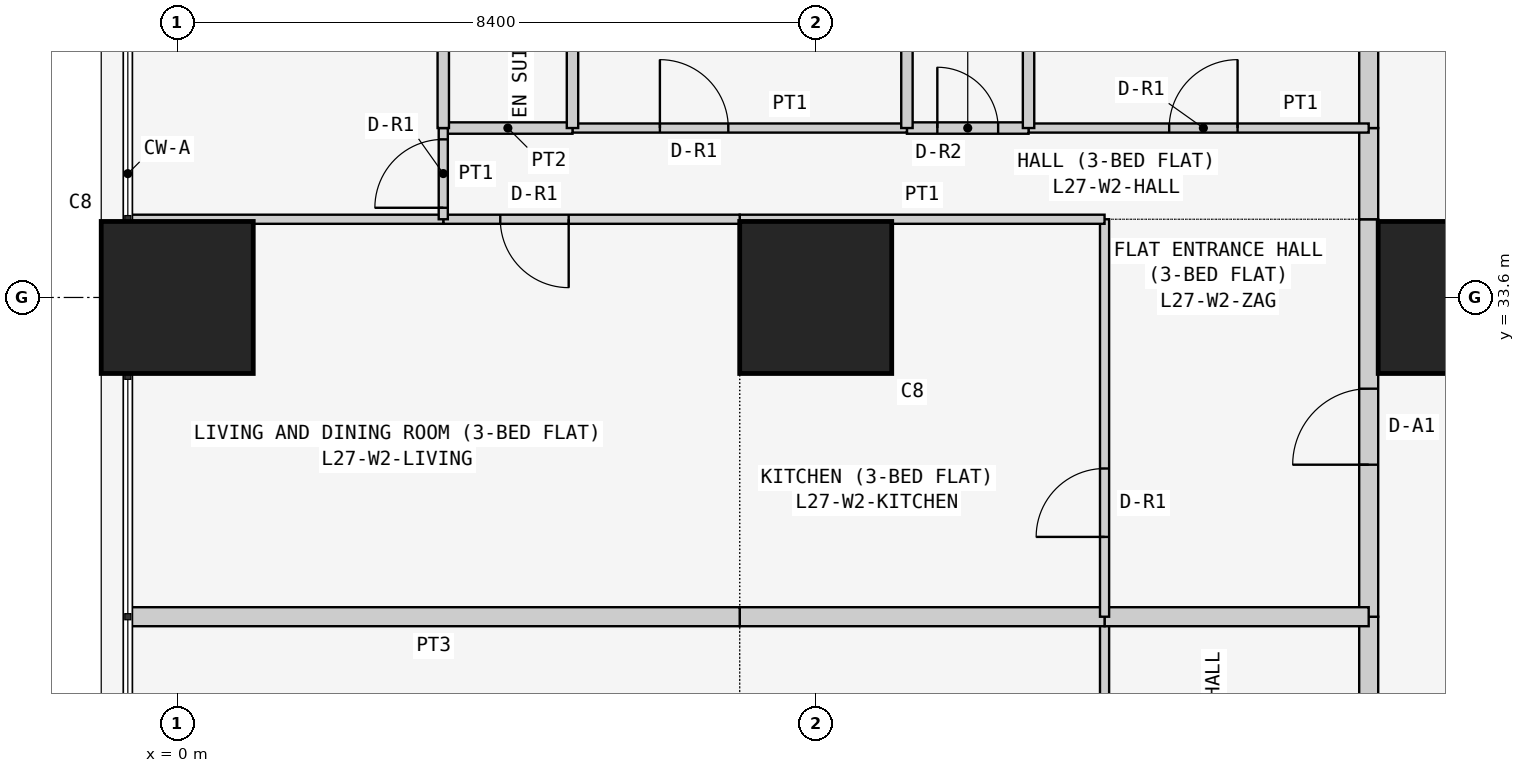
"""IFC4 building model, lengths in metres.
Left out: names, types, materials, properties, quantities, classifications, styles, units other than length and angle.
Written with IfcOpenShell. Run it as: python <this file> out.ifc"""

import sys

from ifc_helpers import new_model, si_unit, direction, frame, frame_2d, origin, origin_2d, place, context, subcontext, project, spatial, rectangle, extrude, element, fill, save


model = new_model("IFC4")
c1 = context("Model", 3, precision=1e-05, world=origin(), true_north=direction((0.0, 1.0)))
c2 = subcontext(c1, "Body", "Model", "MODEL_VIEW")
j1 = project(units=[si_unit("LENGTHUNIT", "METRE"), si_unit("PLANEANGLEUNIT", "RADIAN")], contexts=[c1])
p1 = place(None, origin())
s1 = spatial("IfcSite", under=j1, at=p1, CompositionType="ELEMENT")
p2 = place(p1, origin())
s2 = spatial("IfcBuilding", under=s1, at=p2, CompositionType="ELEMENT")
p3 = place(p2, frame((0.0, 0.0, 108.9)))
s3 = spatial("IfcBuildingStorey", under=s2, at=p3, CompositionType="ELEMENT", Elevation=108.9)
for number, where, z_axis, x_axis in (
    (1, (0.0, 33.6, 0.0), (0.0, 0.0, 1.0), (1.0, 0.0, 0.0)),
    (2, (8.4, 33.6, 0.0), (0.0, 0.0, 1.0), (1.0, 0.0, 0.0)),
    (3, (16.8, 33.6, 0.0), (0.0, 0.0, 1.0), (1.0, 0.0, 0.0)),
):
    element("IfcColumn", number, at=place(p3, frame(where, z_axis=z_axis, x_axis=x_axis)), inside=s3, PredefinedType="COLUMN", context=c2, shape_type="SweptSolid", body=[
        extrude(rectangle(XDim=2.0, YDim=2.0, at=origin_2d()), origin(), (0.0, 0.0, 1.0), 3.6),
    ])
p4 = place(p3, frame((15.675, 24.171, 0.0), z_axis=(0.0, 0.0, 1.0), x_axis=(0.0, 1.0, 0.0)))
e4 = element("IfcWall", 4, at=p4, inside=s3, PredefinedType="PARTITIONING", context=c2, shape_type="SweptSolid", body=[
    extrude(rectangle(XDim=5.229, YDim=0.25, at=frame_2d((2.615, 0.0))), origin(), (0.0, 0.0, 1.0), 3.45),
])
p5 = place(p4, frame((2.179, 0.0, 0.0)))
e5 = element("IfcOpeningElement", 5, at=p5, cuts=e4, PredefinedType="OPENING", context=c2, shape_type="SweptSolid", body=[
    extrude(rectangle(XDim=1.0, YDim=2.1, at=frame_2d((0.5, 1.05))), frame((0.0, 0.135, 0.0), z_axis=(0.0, -1.0, 0.0), x_axis=(1.0, 0.0, 0.0)), (0.0, 0.0, 1.0), 0.27),
])
p6 = place(p3, frame((15.675, 29.4, 0.0), z_axis=(0.0, 0.0, 1.0), x_axis=(0.0, 1.0, 0.0)))
e6 = element("IfcWall", 6, at=p6, inside=s3, PredefinedType="PARTITIONING", context=c2, shape_type="SweptSolid", body=[
    extrude(rectangle(XDim=5.229, YDim=0.25, at=frame_2d((2.615, 0.0))), origin(), (0.0, 0.0, 1.0), 3.45),
])
p7 = place(p6, frame((2.0, 0.0, 0.0)))
e7 = element("IfcOpeningElement", 7, at=p7, cuts=e6, PredefinedType="OPENING", context=c2, shape_type="SweptSolid", body=[
    extrude(rectangle(XDim=1.0, YDim=2.1, at=frame_2d((0.5, 1.05))), frame((0.0, 0.135, 0.0), z_axis=(0.0, -1.0, 0.0), x_axis=(1.0, 0.0, 0.0)), (0.0, 0.0, 1.0), 0.27),
])
p8 = place(p3, frame((15.675, 34.629, 0.0), z_axis=(0.0, 0.0, 1.0), x_axis=(0.0, 1.0, 0.0)))
e8 = element("IfcWall", 8, at=p8, inside=s3, PredefinedType="PARTITIONING", context=c2, shape_type="SweptSolid", body=[
    extrude(rectangle(XDim=1.2, YDim=0.25, at=frame_2d((0.6, 0.0))), origin(), (0.0, 0.0, 1.0), 3.45),
])
p9 = place(p3, frame((15.675, 35.829, 0.0), z_axis=(0.0, 0.0, 1.0), x_axis=(0.0, 1.0, 0.0)))
e9 = element("IfcWall", 9, at=p9, inside=s3, PredefinedType="PARTITIONING", context=c2, shape_type="SweptSolid", body=[
    extrude(rectangle(XDim=6.871, YDim=0.25, at=frame_2d((3.436, 0.0))), origin(), (0.0, 0.0, 1.0), 3.45),
])
p10 = place(p3, frame((12.2, 29.4, 0.0), z_axis=(0.0, 0.0, 1.0), x_axis=(0.0, -1.0, 0.0)))
e10 = element("IfcWall", 10, at=p10, inside=s3, PredefinedType="PARTITIONING", context=c2, shape_type="SweptSolid", body=[
    extrude(rectangle(XDim=5.229, YDim=0.12, at=frame_2d((2.615, 0.0))), origin(), (0.0, 0.0, 1.0), 3.45),
])
p11 = place(p10, frame((1.05, 0.0, 0.0)))
e11 = element("IfcOpeningElement", 11, at=p11, cuts=e10, PredefinedType="OPENING", context=c2, shape_type="SweptSolid", body=[
    extrude(rectangle(XDim=0.9, YDim=2.1, at=frame_2d((0.45, 1.05))), frame((0.0, 0.07, 0.0), z_axis=(0.0, -1.0, 0.0), x_axis=(1.0, 0.0, 0.0)), (0.0, 0.0, 1.0), 0.14),
])
p12 = place(p3, frame((15.675, 29.4, 0.0), z_axis=(0.0, 0.0, 1.0), x_axis=(-1.0, 0.0, 0.0)))
e12 = element("IfcWall", 12, at=p12, inside=s3, PredefinedType="PARTITIONING", context=c2, shape_type="SweptSolid", body=[
    extrude(rectangle(XDim=3.475, YDim=0.25, at=frame_2d((1.738, 0.0))), origin(), (0.0, 0.0, 1.0), 3.45),
])
p13 = place(p3, frame((12.2, 29.4, 0.0), z_axis=(0.0, 0.0, 1.0), x_axis=(-1.0, 0.0, 0.0)))
e13 = element("IfcWall", 13, at=p13, inside=s3, PredefinedType="PARTITIONING", context=c2, shape_type="SweptSolid", body=[
    extrude(rectangle(XDim=4.8, YDim=0.25, at=frame_2d((2.4, 0.0))), origin(), (0.0, 0.0, 1.0), 3.45),
])
p14 = place(p3, frame((7.4, 29.4, 0.0), z_axis=(0.0, 0.0, 1.0), x_axis=(-1.0, 0.0, 0.0)))
e14 = element("IfcWall", 14, at=p14, inside=s3, PredefinedType="PARTITIONING", context=c2, shape_type="SweptSolid", body=[
    extrude(rectangle(XDim=8.05, YDim=0.25, at=frame_2d((4.025, 0.0))), origin(), (0.0, 0.0, 1.0), 3.45),
])
p15 = place(p3, frame((12.2, 29.4, 0.0), z_axis=(0.0, 0.0, 1.0), x_axis=(0.0, 1.0, 0.0)))
e15 = element("IfcWall", 15, at=p15, inside=s3, PredefinedType="PARTITIONING", context=c2, shape_type="SweptSolid", body=[
    extrude(rectangle(XDim=5.229, YDim=0.12, at=frame_2d((2.615, 0.0))), origin(), (0.0, 0.0, 1.0), 3.45),
])
p16 = place(p15, frame((1.05, 0.0, 0.0)))
e16 = element("IfcOpeningElement", 16, at=p16, cuts=e15, PredefinedType="OPENING", context=c2, shape_type="SweptSolid", body=[
    extrude(rectangle(XDim=0.9, YDim=2.1, at=frame_2d((0.45, 1.05))), frame((0.0, 0.07, 0.0), z_axis=(0.0, -1.0, 0.0), x_axis=(1.0, 0.0, 0.0)), (0.0, 0.0, 1.0), 0.14),
])
p17 = place(p3, frame((7.4, 34.629, 0.0), z_axis=(0.0, 0.0, 1.0), x_axis=(1.0, 0.0, 0.0)))
e17 = element("IfcWall", 17, at=p17, inside=s3, PredefinedType="PARTITIONING", context=c2, shape_type="SweptSolid", body=[
    extrude(rectangle(XDim=4.8, YDim=0.12, at=frame_2d((2.4, 0.0))), origin(), (0.0, 0.0, 1.0), 3.45),
])
p18 = place(p3, frame((3.5, 34.629, 0.0), z_axis=(0.0, 0.0, 1.0), x_axis=(1.0, 0.0, 0.0)))
e18 = element("IfcWall", 18, at=p18, inside=s3, PredefinedType="PARTITIONING", context=c2, shape_type="SweptSolid", body=[
    extrude(rectangle(XDim=3.9, YDim=0.12, at=frame_2d((1.95, 0.0))), origin(), (0.0, 0.0, 1.0), 3.45),
])
p19 = place(p18, frame((0.75, 0.0, 0.0)))
e19 = element("IfcOpeningElement", 19, at=p19, cuts=e18, PredefinedType="OPENING", context=c2, shape_type="SweptSolid", body=[
    extrude(rectangle(XDim=0.9, YDim=2.1, at=frame_2d((0.45, 1.05))), frame((0.0, 0.07, 0.0), z_axis=(0.0, -1.0, 0.0), x_axis=(1.0, 0.0, 0.0)), (0.0, 0.0, 1.0), 0.14),
])
p20 = place(p3, frame((-0.65, 34.629, 0.0), z_axis=(0.0, 0.0, 1.0), x_axis=(1.0, 0.0, 0.0)))
e20 = element("IfcWall", 20, at=p20, inside=s3, PredefinedType="PARTITIONING", context=c2, shape_type="SweptSolid", body=[
    extrude(rectangle(XDim=4.15, YDim=0.12, at=frame_2d((2.075, 0.0))), origin(), (0.0, 0.0, 1.0), 3.45),
])
p21 = place(p3, frame((11.2, 35.829, 0.0), z_axis=(0.0, 0.0, 1.0), x_axis=(1.0, 0.0, 0.0)))
e21 = element("IfcWall", 21, at=p21, inside=s3, PredefinedType="PARTITIONING", context=c2, shape_type="SweptSolid", body=[
    extrude(rectangle(XDim=4.475, YDim=0.12, at=frame_2d((2.238, 0.0))), origin(), (0.0, 0.0, 1.0), 3.45),
])
p22 = place(p21, frame((1.85, 0.0, 0.0)))
e22 = element("IfcOpeningElement", 22, at=p22, cuts=e21, PredefinedType="OPENING", context=c2, shape_type="SweptSolid", body=[
    extrude(rectangle(XDim=0.9, YDim=2.1, at=frame_2d((0.45, 1.05))), frame((0.0, 0.07, 0.0), z_axis=(0.0, -1.0, 0.0), x_axis=(1.0, 0.0, 0.0)), (0.0, 0.0, 1.0), 0.14),
])
p23 = place(p3, frame((9.6, 35.829, 0.0), z_axis=(0.0, 0.0, 1.0), x_axis=(1.0, 0.0, 0.0)))
e23 = element("IfcWall", 23, at=p23, inside=s3, PredefinedType="PARTITIONING", context=c2, shape_type="SweptSolid", body=[
    extrude(rectangle(XDim=1.6, YDim=0.15, at=frame_2d((0.8, 0.0))), origin(), (0.0, 0.0, 1.0), 3.45),
])
p24 = place(p23, frame((0.4, 0.0, 0.0)))
e24 = element("IfcOpeningElement", 24, at=p24, cuts=e23, PredefinedType="OPENING", context=c2, shape_type="SweptSolid", body=[
    extrude(rectangle(XDim=0.8, YDim=2.1, at=frame_2d((0.4, 1.05))), frame((0.0, 0.085, 0.0), z_axis=(0.0, -1.0, 0.0), x_axis=(1.0, 0.0, 0.0)), (0.0, 0.0, 1.0), 0.17),
])
p25 = place(p3, frame((5.2, 35.829, 0.0), z_axis=(0.0, 0.0, 1.0), x_axis=(1.0, 0.0, 0.0)))
e25 = element("IfcWall", 25, at=p25, inside=s3, PredefinedType="PARTITIONING", context=c2, shape_type="SweptSolid", body=[
    extrude(rectangle(XDim=4.4, YDim=0.12, at=frame_2d((2.2, 0.0))), origin(), (0.0, 0.0, 1.0), 3.45),
])
p26 = place(p25, frame((1.15, 0.0, 0.0)))
e26 = element("IfcOpeningElement", 26, at=p26, cuts=e25, PredefinedType="OPENING", context=c2, shape_type="SweptSolid", body=[
    extrude(rectangle(XDim=0.9, YDim=2.1, at=frame_2d((0.45, 1.05))), frame((0.0, 0.07, 0.0), z_axis=(0.0, -1.0, 0.0), x_axis=(1.0, 0.0, 0.0)), (0.0, 0.0, 1.0), 0.14),
])
p27 = place(p3, frame((3.5, 35.829, 0.0), z_axis=(0.0, 0.0, 1.0), x_axis=(1.0, 0.0, 0.0)))
e27 = element("IfcWall", 27, at=p27, inside=s3, PredefinedType="PARTITIONING", context=c2, shape_type="SweptSolid", body=[
    extrude(rectangle(XDim=1.7, YDim=0.15, at=frame_2d((0.85, 0.0))), origin(), (0.0, 0.0, 1.0), 3.45),
])
p28 = place(p3, frame((3.5, 34.629, 0.0), z_axis=(0.0, 0.0, 1.0), x_axis=(0.0, 1.0, 0.0)))
e28 = element("IfcWall", 28, at=p28, inside=s3, PredefinedType="PARTITIONING", context=c2, shape_type="SweptSolid", body=[
    extrude(rectangle(XDim=1.2, YDim=0.12, at=frame_2d((0.6, 0.0))), origin(), (0.0, 0.0, 1.0), 3.45),
])
p29 = place(p28, frame((0.151, 0.0, 0.0)))
e29 = element("IfcOpeningElement", 29, at=p29, cuts=e28, PredefinedType="OPENING", context=c2, shape_type="SweptSolid", body=[
    extrude(rectangle(XDim=0.9, YDim=2.1, at=frame_2d((0.45, 1.05))), frame((0.0, 0.07, 0.0), z_axis=(0.0, -1.0, 0.0), x_axis=(1.0, 0.0, 0.0)), (0.0, 0.0, 1.0), 0.14),
])
for number, where, z_axis, x_axis in (
    (30, (11.2, 35.829, 0.0), (0.0, 0.0, 1.0), (0.0, 1.0, 0.0)),
    (31, (9.6, 35.829, 0.0), (0.0, 0.0, 1.0), (0.0, 1.0, 0.0)),
    (32, (5.2, 35.829, 0.0), (0.0, 0.0, 1.0), (0.0, 1.0, 0.0)),
):
    element("IfcWall", number, at=place(p3, frame(where, z_axis=z_axis, x_axis=x_axis)), inside=s3, PredefinedType="PARTITIONING", context=c2, shape_type="SweptSolid", body=[
        extrude(rectangle(XDim=6.871, YDim=0.15, at=frame_2d((3.436, 0.0))), origin(), (0.0, 0.0, 1.0), 3.45),
    ])
p30 = place(p3, frame((3.5, 35.829, 0.0), z_axis=(0.0, 0.0, 1.0), x_axis=(0.0, 1.0, 0.0)))
e33 = element("IfcWall", 33, at=p30, inside=s3, PredefinedType="PARTITIONING", context=c2, shape_type="SweptSolid", body=[
    extrude(rectangle(XDim=6.871, YDim=0.15, at=frame_2d((3.436, 0.0))), origin(), (0.0, 0.0, 1.0), 3.45),
])
p31 = place(p30, frame((3.171, 0.0, 0.0)))
e34 = element("IfcOpeningElement", 34, at=p31, cuts=e33, PredefinedType="OPENING", context=c2, shape_type="SweptSolid", body=[
    extrude(rectangle(XDim=0.8, YDim=2.1, at=frame_2d((0.4, 1.05))), frame((0.0, 0.085, 0.0), z_axis=(0.0, -1.0, 0.0), x_axis=(1.0, 0.0, 0.0)), (0.0, 0.0, 1.0), 0.17),
])
p32 = place(p7, origin())
e35 = element("IfcDoor", 35, at=p32, inside=s3, OperationType="SINGLE_SWING_LEFT", PredefinedType="DOOR", context=c2, shape_type="SweptSolid", body=[
    extrude(rectangle(XDim=1.0, YDim=2.1, at=frame_2d((0.5, 1.05))), frame((0.0, 0.025, 0.0), z_axis=(0.0, -1.0, 0.0), x_axis=(1.0, 0.0, 0.0)), (0.0, 0.0, 1.0), 0.05),
])
fill(e7, e35)
p33 = place(p16, origin())
e36 = element("IfcDoor", 36, at=p33, inside=s3, OperationType="SINGLE_SWING_LEFT", PredefinedType="DOOR", context=c2, shape_type="SweptSolid", body=[
    extrude(rectangle(XDim=0.9, YDim=2.1, at=frame_2d((0.45, 1.05))), frame((0.0, 0.025, 0.0), z_axis=(0.0, -1.0, 0.0), x_axis=(1.0, 0.0, 0.0)), (0.0, 0.0, 1.0), 0.05),
])
fill(e16, e36)
p34 = place(p19, frame((0.9, 0.0, 0.0), z_axis=(0.0, 0.0, 1.0), x_axis=(-1.0, 0.0, 0.0)))
e37 = element("IfcDoor", 37, at=p34, inside=s3, OperationType="SINGLE_SWING_LEFT", PredefinedType="DOOR", context=c2, shape_type="SweptSolid", body=[
    extrude(rectangle(XDim=0.9, YDim=2.1, at=frame_2d((0.45, 1.05))), frame((0.0, 0.025, 0.0), z_axis=(0.0, -1.0, 0.0), x_axis=(1.0, 0.0, 0.0)), (0.0, 0.0, 1.0), 0.05),
])
fill(e19, e37)
p35 = place(p22, origin())
e38 = element("IfcDoor", 38, at=p35, inside=s3, OperationType="SINGLE_SWING_RIGHT", PredefinedType="DOOR", context=c2, shape_type="SweptSolid", body=[
    extrude(rectangle(XDim=0.9, YDim=2.1, at=frame_2d((0.45, 1.05))), frame((0.0, 0.025, 0.0), z_axis=(0.0, -1.0, 0.0), x_axis=(1.0, 0.0, 0.0)), (0.0, 0.0, 1.0), 0.05),
])
fill(e22, e38)
p36 = place(p24, origin())
e39 = element("IfcDoor", 39, at=p36, inside=s3, OperationType="SINGLE_SWING_LEFT", PredefinedType="DOOR", context=c2, shape_type="SweptSolid", body=[
    extrude(rectangle(XDim=0.8, YDim=2.1, at=frame_2d((0.4, 1.05))), frame((0.0, 0.025, 0.0), z_axis=(0.0, -1.0, 0.0), x_axis=(1.0, 0.0, 0.0)), (0.0, 0.0, 1.0), 0.05),
])
fill(e24, e39)
p37 = place(p26, origin())
e40 = element("IfcDoor", 40, at=p37, inside=s3, OperationType="SINGLE_SWING_LEFT", PredefinedType="DOOR", context=c2, shape_type="SweptSolid", body=[
    extrude(rectangle(XDim=0.9, YDim=2.1, at=frame_2d((0.45, 1.05))), frame((0.0, 0.025, 0.0), z_axis=(0.0, -1.0, 0.0), x_axis=(1.0, 0.0, 0.0)), (0.0, 0.0, 1.0), 0.05),
])
fill(e26, e40)
p38 = place(p29, origin())
e41 = element("IfcDoor", 41, at=p38, inside=s3, OperationType="SINGLE_SWING_LEFT", PredefinedType="DOOR", context=c2, shape_type="SweptSolid", body=[
    extrude(rectangle(XDim=0.9, YDim=2.1, at=frame_2d((0.45, 1.05))), frame((0.0, 0.025, 0.0), z_axis=(0.0, -1.0, 0.0), x_axis=(1.0, 0.0, 0.0)), (0.0, 0.0, 1.0), 0.05),
])
fill(e29, e41)
save(model, sys.argv[1])
